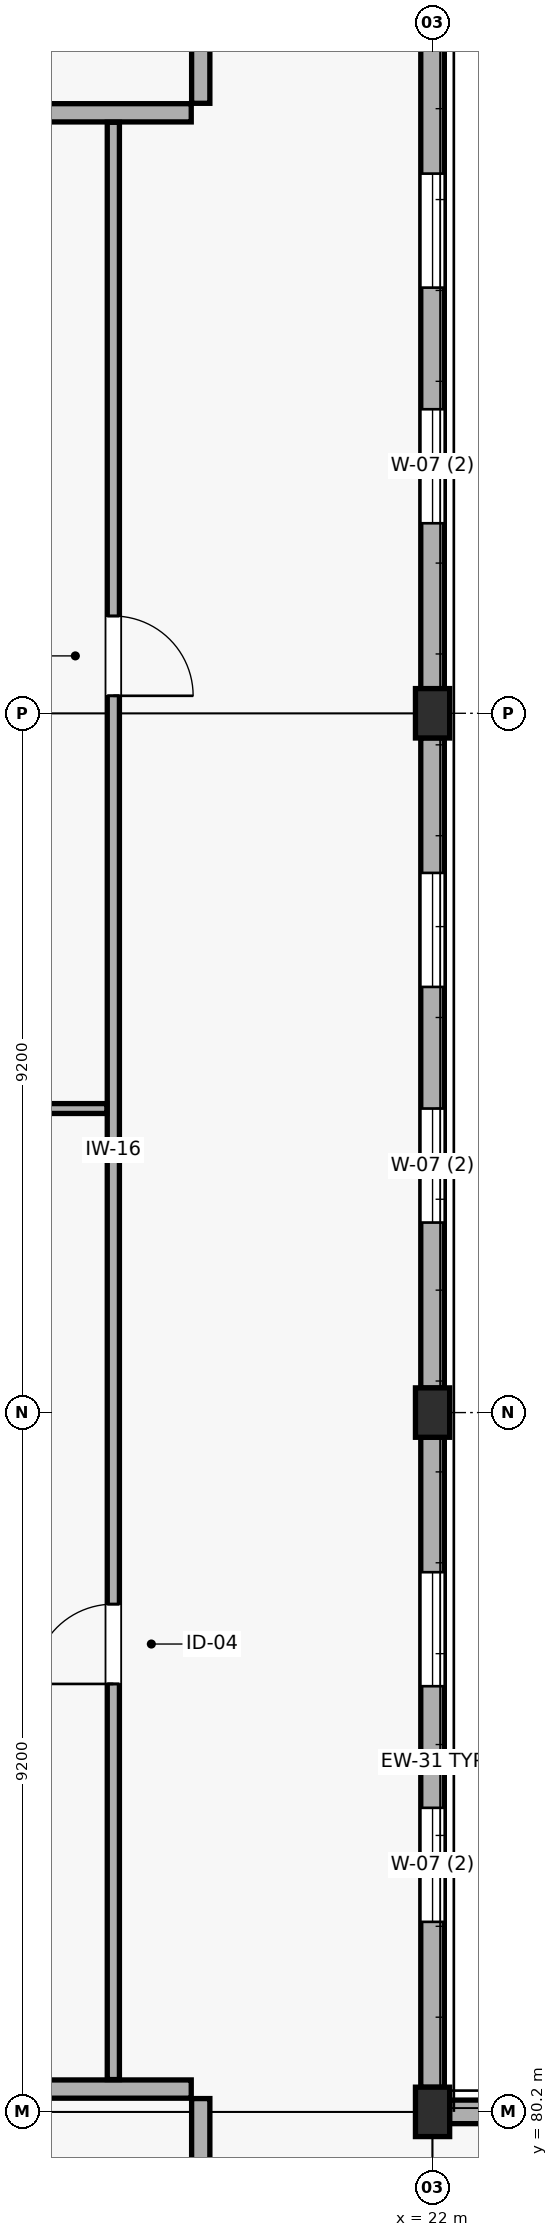
"""IFC4 building model, lengths in metres.
Left out: names, types, materials, properties, quantities, classifications, styles, units other than length and angle.
Written with IfcOpenShell. Run it as: python <this file> out.ifc"""

import sys

from ifc_helpers import new_model, si_unit, direction, frame, frame_2d, origin, origin_2d, place, context, subcontext, project, spatial, rectangle, extrude, element, fill, save


model = new_model("IFC4")
c1 = context("Model", 3, precision=1e-05, world=origin(), true_north=direction((0.0, 1.0)))
c2 = subcontext(c1, "Body", "Model", "MODEL_VIEW")
j1 = project(units=[si_unit("LENGTHUNIT", "METRE"), si_unit("PLANEANGLEUNIT", "RADIAN")], contexts=[c1])
p1 = place(None, origin())
s1 = spatial("IfcSite", under=j1, at=p1, CompositionType="ELEMENT")
p2 = place(p1, origin())
s2 = spatial("IfcBuilding", under=s1, at=p2, CompositionType="ELEMENT")
p3 = place(p2, frame((0.0, 0.0, 14.1)))
s3 = spatial("IfcBuildingStorey", under=s2, at=p3, CompositionType="ELEMENT", Elevation=14.1)
for number, where, z_axis, x_axis in (
    (1, (22.0, 80.2, 0.0), (0.0, 0.0, 1.0), (1.0, 0.0, 0.0)),
    (2, (22.0, 89.4, 0.0), (0.0, 0.0, 1.0), (1.0, 0.0, 0.0)),
    (3, (22.0, 98.6, 0.0), (0.0, 0.0, 1.0), (1.0, 0.0, 0.0)),
):
    element("IfcColumn", number, at=place(p3, frame(where, z_axis=z_axis, x_axis=x_axis)), inside=s3, PredefinedType="COLUMN", context=c2, shape_type="SweptSolid", body=[
        extrude(rectangle(XDim=0.45, YDim=0.65, at=origin_2d()), origin(), (0.0, 0.0, 1.0), 4.2),
    ])
p4 = place(p3, frame((22.223, 80.2, 0.0), z_axis=(0.0, 0.0, 1.0), x_axis=(1.0, 0.0, 0.0)))
e4 = element("IfcWall", 4, at=p4, inside=s3, PredefinedType="SOLIDWALL", context=c2, shape_type="SweptSolid", body=[
    extrude(rectangle(XDim=10.554, YDim=0.31, at=frame_2d((5.277, 0.0))), origin(), (0.0, 0.0, 1.0), 3.437),
])
p5 = place(p4, frame((2.477, 0.0, 0.95)))
e5 = element("IfcOpeningElement", 5, at=p5, cuts=e4, PredefinedType="OPENING", context=c2, shape_type="SweptSolid", body=[
    extrude(rectangle(XDim=1.65, YDim=2.25, at=frame_2d((0.825, 1.125))), frame((0.0, 0.165, 0.0), z_axis=(0.0, -1.0, 0.0), x_axis=(1.0, 0.0, 0.0)), (0.0, 0.0, 1.0), 0.33),
])
p6 = place(p4, frame((6.077, 0.0, 0.95)))
e6 = element("IfcOpeningElement", 6, at=p6, cuts=e4, PredefinedType="OPENING", context=c2, shape_type="SweptSolid", body=[
    extrude(rectangle(XDim=1.65, YDim=2.25, at=frame_2d((0.825, 1.125))), frame((0.0, 0.165, 0.0), z_axis=(0.0, -1.0, 0.0), x_axis=(1.0, 0.0, 0.0)), (0.0, 0.0, 1.0), 0.33),
])
p7 = place(p3, frame((22.0, 80.523, 0.0), z_axis=(0.0, 0.0, 1.0), x_axis=(0.0, 1.0, 0.0)))
e7 = element("IfcWall", 7, at=p7, inside=s3, PredefinedType="SOLIDWALL", context=c2, shape_type="SweptSolid", body=[
    extrude(rectangle(XDim=8.554, YDim=0.31, at=frame_2d((4.277, 0.0))), origin(), (0.0, 0.0, 1.0), 3.439),
])
p8 = place(p7, frame((2.177, 0.0, 0.95)))
e8 = element("IfcOpeningElement", 8, at=p8, cuts=e7, PredefinedType="OPENING", context=c2, shape_type="SweptSolid", body=[
    extrude(rectangle(XDim=1.5, YDim=2.25, at=frame_2d((0.75, 1.125))), frame((0.0, 0.165, 0.0), z_axis=(0.0, -1.0, 0.0), x_axis=(1.0, 0.0, 0.0)), (0.0, 0.0, 1.0), 0.33),
])
p9 = place(p7, frame((5.277, 0.0, 0.95)))
e9 = element("IfcOpeningElement", 9, at=p9, cuts=e7, PredefinedType="OPENING", context=c2, shape_type="SweptSolid", body=[
    extrude(rectangle(XDim=1.5, YDim=2.25, at=frame_2d((0.75, 1.125))), frame((0.0, 0.165, 0.0), z_axis=(0.0, -1.0, 0.0), x_axis=(1.0, 0.0, 0.0)), (0.0, 0.0, 1.0), 0.33),
])
p10 = place(p3, frame((22.0, 89.723, 0.0), z_axis=(0.0, 0.0, 1.0), x_axis=(0.0, 1.0, 0.0)))
e10 = element("IfcWall", 10, at=p10, inside=s3, PredefinedType="SOLIDWALL", context=c2, shape_type="SweptSolid", body=[
    extrude(rectangle(XDim=8.554, YDim=0.31, at=frame_2d((4.277, 0.0))), origin(), (0.0, 0.0, 1.0), 3.439),
])
p11 = place(p10, frame((2.177, 0.0, 0.95)))
e11 = element("IfcOpeningElement", 11, at=p11, cuts=e10, PredefinedType="OPENING", context=c2, shape_type="SweptSolid", body=[
    extrude(rectangle(XDim=1.5, YDim=2.25, at=frame_2d((0.75, 1.125))), frame((0.0, 0.165, 0.0), z_axis=(0.0, -1.0, 0.0), x_axis=(1.0, 0.0, 0.0)), (0.0, 0.0, 1.0), 0.33),
])
p12 = place(p10, frame((5.277, 0.0, 0.95)))
e12 = element("IfcOpeningElement", 12, at=p12, cuts=e10, PredefinedType="OPENING", context=c2, shape_type="SweptSolid", body=[
    extrude(rectangle(XDim=1.5, YDim=2.25, at=frame_2d((0.75, 1.125))), frame((0.0, 0.165, 0.0), z_axis=(0.0, -1.0, 0.0), x_axis=(1.0, 0.0, 0.0)), (0.0, 0.0, 1.0), 0.33),
])
p13 = place(p3, frame((22.0, 98.923, 0.0), z_axis=(0.0, 0.0, 1.0), x_axis=(0.0, 1.0, 0.0)))
e13 = element("IfcWall", 13, at=p13, inside=s3, PredefinedType="SOLIDWALL", context=c2, shape_type="SweptSolid", body=[
    extrude(rectangle(XDim=8.554, YDim=0.31, at=frame_2d((4.277, 0.0))), origin(), (0.0, 0.0, 1.0), 3.439),
])
p14 = place(p13, frame((2.177, 0.0, 0.95)))
e14 = element("IfcOpeningElement", 14, at=p14, cuts=e13, PredefinedType="OPENING", context=c2, shape_type="SweptSolid", body=[
    extrude(rectangle(XDim=1.5, YDim=2.25, at=frame_2d((0.75, 1.125))), frame((0.0, 0.165, 0.0), z_axis=(0.0, -1.0, 0.0), x_axis=(1.0, 0.0, 0.0)), (0.0, 0.0, 1.0), 0.33),
])
p15 = place(p13, frame((5.277, 0.0, 0.95)))
e15 = element("IfcOpeningElement", 15, at=p15, cuts=e13, PredefinedType="OPENING", context=c2, shape_type="SweptSolid", body=[
    extrude(rectangle(XDim=1.5, YDim=2.25, at=frame_2d((0.75, 1.125))), frame((0.0, 0.165, 0.0), z_axis=(0.0, -1.0, 0.0), x_axis=(1.0, 0.0, 0.0)), (0.0, 0.0, 1.0), 0.33),
])
p16 = place(p3, frame((0.145, 106.5, 0.0), z_axis=(0.0, 0.0, 1.0), x_axis=(1.0, 0.0, 0.0)))
e16 = element("IfcWall", 16, at=p16, inside=s3, PredefinedType="PARTITIONING", context=c2, shape_type="SweptSolid", body=[
    extrude(rectangle(XDim=18.68, YDim=0.24, at=frame_2d((9.34, 0.0))), origin(), (0.0, 0.0, 1.0), 3.439),
])
p17 = place(p16, frame((13.855, 0.0, 0.0)))
e17 = element("IfcOpeningElement", 17, at=p17, cuts=e16, PredefinedType="OPENING", context=c2, shape_type="SweptSolid", body=[
    extrude(rectangle(XDim=1.25, YDim=2.2, at=frame_2d((0.625, 1.1))), frame((0.0, 0.13, 0.0), z_axis=(0.0, -1.0, 0.0), x_axis=(1.0, 0.0, 0.0)), (0.0, 0.0, 1.0), 0.26),
])
p18 = place(p3, frame((0.23, 80.5, 0.0), z_axis=(0.0, 0.0, 1.0), x_axis=(1.0, 0.0, 0.0)))
e18 = element("IfcWall", 18, at=p18, inside=s3, PredefinedType="PARTITIONING", context=c2, shape_type="SweptSolid", body=[
    extrude(rectangle(XDim=18.595, YDim=0.24, at=frame_2d((9.297, 0.0))), origin(), (0.0, 0.0, 1.0), 3.439),
])
p19 = place(p18, frame((13.77, 0.0, 0.0)))
e19 = element("IfcOpeningElement", 19, at=p19, cuts=e18, PredefinedType="OPENING", context=c2, shape_type="SweptSolid", body=[
    extrude(rectangle(XDim=1.25, YDim=2.2, at=frame_2d((0.625, 1.1))), frame((0.0, 0.13, 0.0), z_axis=(0.0, -1.0, 0.0), x_axis=(1.0, 0.0, 0.0)), (0.0, 0.0, 1.0), 0.26),
])
p20 = place(p3, frame((17.8, 80.625, 0.0), z_axis=(0.0, 0.0, 1.0), x_axis=(0.0, 1.0, 0.0)))
e20 = element("IfcWall", 20, at=p20, inside=s3, PredefinedType="PARTITIONING", context=c2, shape_type="SweptSolid", body=[
    extrude(rectangle(XDim=25.75, YDim=0.16, at=frame_2d((12.875, 0.0))), origin(), (0.0, 0.0, 1.0), 3.437),
])
p21 = place(p20, frame((5.205, 0.0, 0.0)))
e21 = element("IfcOpeningElement", 21, at=p21, cuts=e20, PredefinedType="OPENING", context=c2, shape_type="SweptSolid", body=[
    extrude(rectangle(XDim=1.05, YDim=2.2, at=frame_2d((0.525, 1.1))), frame((0.0, 0.09, 0.0), z_axis=(0.0, -1.0, 0.0), x_axis=(1.0, 0.0, 0.0)), (0.0, 0.0, 1.0), 0.18),
])
p22 = place(p20, frame((18.205, 0.0, 0.0)))
e22 = element("IfcOpeningElement", 22, at=p22, cuts=e20, PredefinedType="OPENING", context=c2, shape_type="SweptSolid", body=[
    extrude(rectangle(XDim=1.05, YDim=2.2, at=frame_2d((0.525, 1.1))), frame((0.0, 0.09, 0.0), z_axis=(0.0, -1.0, 0.0), x_axis=(1.0, 0.0, 0.0)), (0.0, 0.0, 1.0), 0.18),
])
p23 = place(p3, frame((0.145, 93.4, 0.0), z_axis=(0.0, 0.0, 1.0), x_axis=(1.0, 0.0, 0.0)))
e23 = element("IfcWall", 23, at=p23, inside=s3, PredefinedType="PARTITIONING", context=c2, shape_type="SweptSolid", body=[
    extrude(rectangle(XDim=17.57, YDim=0.13, at=frame_2d((8.785, 0.0))), origin(), (0.0, 0.0, 1.0), 3.439),
])
p24 = place(p3, frame((18.95, 106.625, 0.0), z_axis=(0.0, 0.0, 1.0), x_axis=(0.0, 1.0, 0.0)))
e24 = element("IfcWall", 24, at=p24, inside=s3, PredefinedType="PARTITIONING", context=c2, shape_type="SweptSolid", body=[
    extrude(rectangle(XDim=3.525, YDim=0.24, at=frame_2d((1.762, 0.0))), origin(), (0.0, 0.0, 1.0), 3.437),
])
p25 = place(p24, frame((1.055, 0.0, 0.0)))
e25 = element("IfcOpeningElement", 25, at=p25, cuts=e24, PredefinedType="OPENING", context=c2, shape_type="SweptSolid", body=[
    extrude(rectangle(XDim=1.25, YDim=2.2, at=frame_2d((0.625, 1.1))), frame((0.0, 0.13, 0.0), z_axis=(0.0, -1.0, 0.0), x_axis=(1.0, 0.0, 0.0)), (0.0, 0.0, 1.0), 0.26),
])
p26 = place(p3, frame((18.95, 76.85, 0.0), z_axis=(0.0, 0.0, 1.0), x_axis=(0.0, 1.0, 0.0)))
e26 = element("IfcWall", 26, at=p26, inside=s3, PredefinedType="PARTITIONING", context=c2, shape_type="SweptSolid", body=[
    extrude(rectangle(XDim=3.525, YDim=0.24, at=frame_2d((1.762, 0.0))), origin(), (0.0, 0.0, 1.0), 3.437),
])
p27 = place(p26, frame((1.05, 0.0, 0.0)))
e27 = element("IfcOpeningElement", 27, at=p27, cuts=e26, PredefinedType="OPENING", context=c2, shape_type="SweptSolid", body=[
    extrude(rectangle(XDim=1.25, YDim=2.2, at=frame_2d((0.625, 1.1))), frame((0.0, 0.13, 0.0), z_axis=(0.0, -1.0, 0.0), x_axis=(1.0, 0.0, 0.0)), (0.0, 0.0, 1.0), 0.26),
])
p28 = place(p8, origin())
e28 = element("IfcWindow", 28, at=p28, inside=s3, PartitioningType="SINGLE_PANEL", PredefinedType="WINDOW", context=c2, shape_type="SweptSolid", body=[
    extrude(rectangle(XDim=1.5, YDim=2.25, at=frame_2d((0.75, 1.125))), frame((0.0, 0.03, 0.0), z_axis=(0.0, -1.0, 0.0), x_axis=(1.0, 0.0, 0.0)), (0.0, 0.0, 1.0), 0.06),
])
fill(e8, e28)
p29 = place(p9, origin())
e29 = element("IfcWindow", 29, at=p29, inside=s3, PartitioningType="SINGLE_PANEL", PredefinedType="WINDOW", context=c2, shape_type="SweptSolid", body=[
    extrude(rectangle(XDim=1.5, YDim=2.25, at=frame_2d((0.75, 1.125))), frame((0.0, 0.03, 0.0), z_axis=(0.0, -1.0, 0.0), x_axis=(1.0, 0.0, 0.0)), (0.0, 0.0, 1.0), 0.06),
])
fill(e9, e29)
p30 = place(p11, origin())
e30 = element("IfcWindow", 30, at=p30, inside=s3, PartitioningType="SINGLE_PANEL", PredefinedType="WINDOW", context=c2, shape_type="SweptSolid", body=[
    extrude(rectangle(XDim=1.5, YDim=2.25, at=frame_2d((0.75, 1.125))), frame((0.0, 0.03, 0.0), z_axis=(0.0, -1.0, 0.0), x_axis=(1.0, 0.0, 0.0)), (0.0, 0.0, 1.0), 0.06),
])
fill(e11, e30)
p31 = place(p12, origin())
e31 = element("IfcWindow", 31, at=p31, inside=s3, PartitioningType="SINGLE_PANEL", PredefinedType="WINDOW", context=c2, shape_type="SweptSolid", body=[
    extrude(rectangle(XDim=1.5, YDim=2.25, at=frame_2d((0.75, 1.125))), frame((0.0, 0.03, 0.0), z_axis=(0.0, -1.0, 0.0), x_axis=(1.0, 0.0, 0.0)), (0.0, 0.0, 1.0), 0.06),
])
fill(e12, e31)
p32 = place(p14, origin())
e32 = element("IfcWindow", 32, at=p32, inside=s3, PartitioningType="SINGLE_PANEL", PredefinedType="WINDOW", context=c2, shape_type="SweptSolid", body=[
    extrude(rectangle(XDim=1.5, YDim=2.25, at=frame_2d((0.75, 1.125))), frame((0.0, 0.03, 0.0), z_axis=(0.0, -1.0, 0.0), x_axis=(1.0, 0.0, 0.0)), (0.0, 0.0, 1.0), 0.06),
])
fill(e14, e32)
p33 = place(p15, origin())
e33 = element("IfcWindow", 33, at=p33, inside=s3, PartitioningType="SINGLE_PANEL", PredefinedType="WINDOW", context=c2, shape_type="SweptSolid", body=[
    extrude(rectangle(XDim=1.5, YDim=2.25, at=frame_2d((0.75, 1.125))), frame((0.0, 0.03, 0.0), z_axis=(0.0, -1.0, 0.0), x_axis=(1.0, 0.0, 0.0)), (0.0, 0.0, 1.0), 0.06),
])
fill(e15, e33)
p34 = place(p21, origin())
e34 = element("IfcDoor", 34, at=p34, inside=s3, OperationType="SINGLE_SWING_LEFT", PredefinedType="DOOR", context=c2, shape_type="SweptSolid", body=[
    extrude(rectangle(XDim=1.05, YDim=2.2, at=frame_2d((0.525, 1.1))), frame((0.0, 0.025, 0.0), z_axis=(0.0, -1.0, 0.0), x_axis=(1.0, 0.0, 0.0)), (0.0, 0.0, 1.0), 0.05),
])
fill(e21, e34)
p35 = place(p22, frame((1.05, 0.0, 0.0), z_axis=(0.0, 0.0, 1.0), x_axis=(-1.0, 0.0, 0.0)))
e35 = element("IfcDoor", 35, at=p35, inside=s3, OperationType="SINGLE_SWING_RIGHT", PredefinedType="DOOR", context=c2, shape_type="SweptSolid", body=[
    extrude(rectangle(XDim=1.05, YDim=2.2, at=frame_2d((0.525, 1.1))), frame((0.0, 0.025, 0.0), z_axis=(0.0, -1.0, 0.0), x_axis=(1.0, 0.0, 0.0)), (0.0, 0.0, 1.0), 0.05),
])
fill(e22, e35)
save(model, sys.argv[1])
